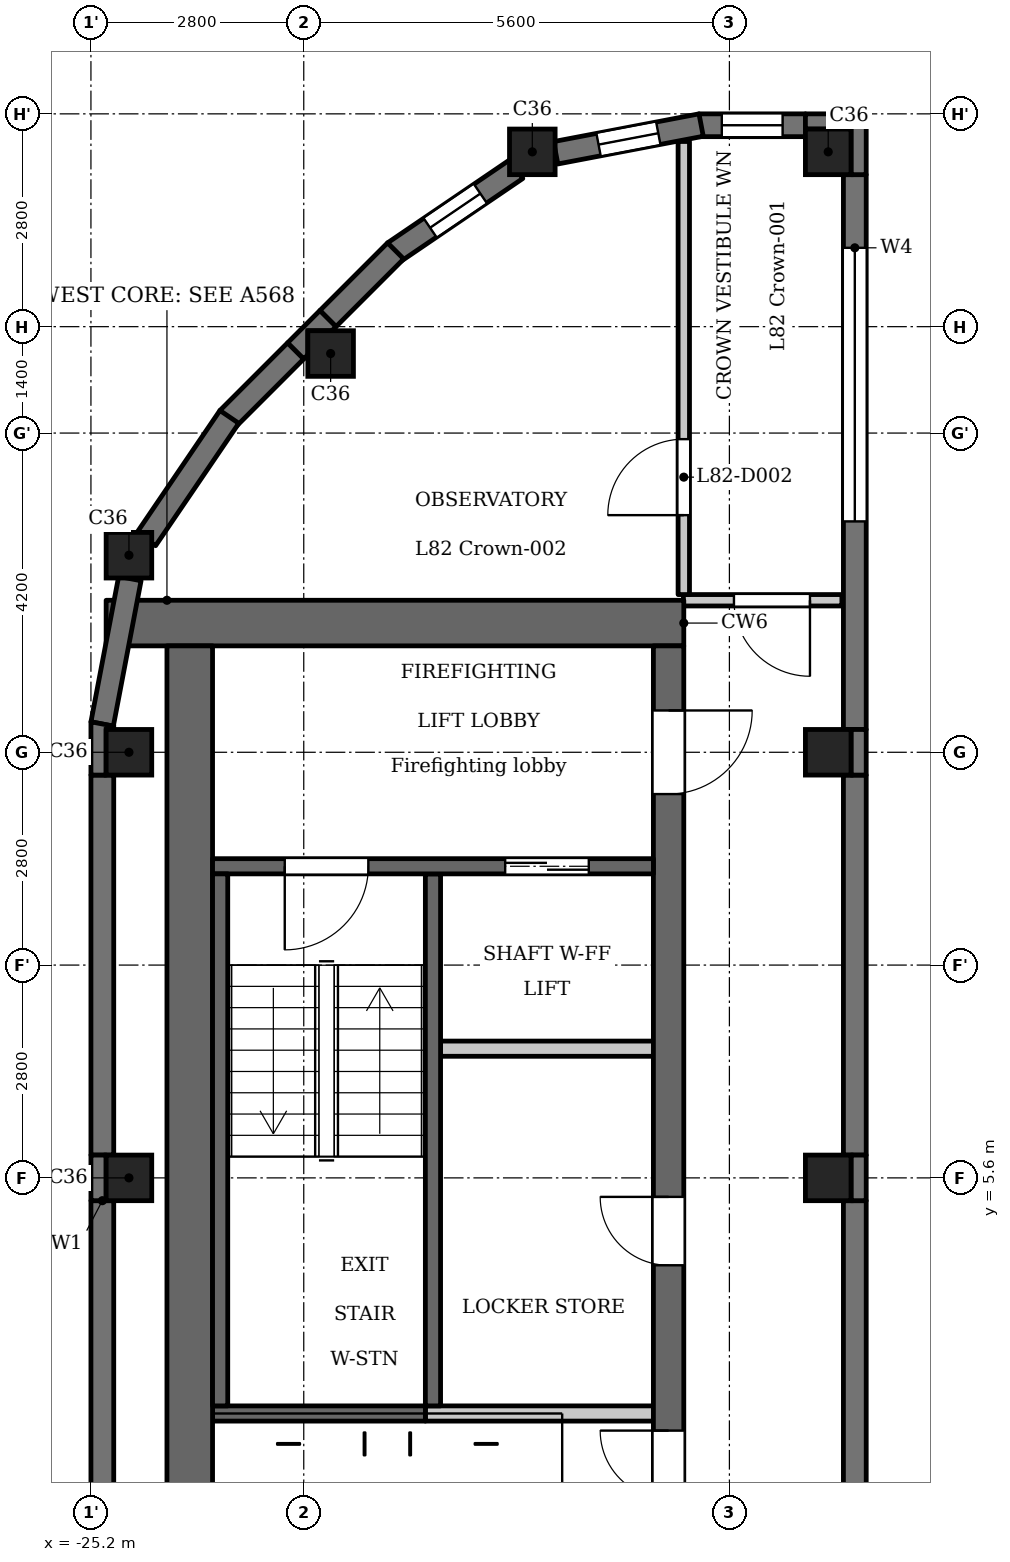
"""IFC4 building model, lengths in metres.
Left out: names, types, materials, properties, quantities, classifications, styles, units other than length and angle.
Written with IfcOpenShell. Run it as: python <this file> out.ifc"""

import sys

from ifc_helpers import new_model, si_unit, direction, frame, frame_2d, origin, origin_2d, place, context, subcontext, project, spatial, polyline, rectangle, outline, extrude, element, fill, save


model = new_model("IFC4")
c1 = context("Model", 3, precision=1e-05, world=origin(), true_north=direction((0.0, 1.0)))
c2 = subcontext(c1, "Body", "Model", "MODEL_VIEW")
j1 = project(units=[si_unit("LENGTHUNIT", "METRE"), si_unit("PLANEANGLEUNIT", "RADIAN")], contexts=[c1])
p1 = place(None, origin())
s1 = spatial("IfcSite", under=j1, at=p1, CompositionType="ELEMENT")
p2 = place(p1, origin())
s2 = spatial("IfcBuilding", under=s1, at=p2, CompositionType="ELEMENT")
p3 = place(p2, frame((0.0, 0.0, 317.4)))
s3 = spatial("IfcBuildingStorey", under=s2, at=p3, CompositionType="ELEMENT", Elevation=317.4)
for number, where, z_axis, x_axis in (
    (1, (-24.7, 5.6, 0.0), (0.0, 0.0, 1.0), (1.0, 0.0, 0.0)),
    (2, (-24.7, 11.2, 0.0), (0.0, 0.0, 1.0), (1.0, 0.0, 0.0)),
    (3, (-24.7, 13.793, 0.0), (0.0, 0.0, 1.0), (1.0, 0.0, 0.0)),
    (4, (-22.046, 16.446, 0.0), (0.0, 0.0, 1.0), (1.0, 0.0, 0.0)),
    (5, (-19.393, 19.1, 0.0), (0.0, 0.0, 1.0), (1.0, 0.0, 0.0)),
    (6, (-15.5, 5.6, 0.0), (0.0, 0.0, 1.0), (1.0, 0.0, 0.0)),
    (7, (-15.5, 11.2, 0.0), (0.0, 0.0, 1.0), (1.0, 0.0, 0.0)),
    (8, (-15.5, 19.1, 0.0), (0.0, 0.0, 1.0), (1.0, 0.0, 0.0)),
):
    element("IfcColumn", number, at=place(p3, frame(where, z_axis=z_axis, x_axis=x_axis)), inside=s3, PredefinedType="COLUMN", context=c2, shape_type="SweptSolid", body=[
        extrude(rectangle(XDim=0.6, YDim=0.6, at=origin_2d()), origin(), (0.0, 0.0, 1.0), 3.5),
    ])
p4 = place(p3, frame((-15.15, -5.3, 0.0), z_axis=(0.0, 0.0, 1.0), x_axis=(0.0, 1.0, 0.0)))
e9 = element("IfcWall", 9, at=p4, inside=s3, PredefinedType="SOLIDWALL", context=c2, shape_type="SweptSolid", body=[
    extrude(rectangle(XDim=10.6, YDim=0.3, at=frame_2d((5.3, 0.0))), origin(), (0.0, 0.0, 1.0), 3.2),
])
p5 = place(p3, frame((-15.15, 5.9, 0.0), z_axis=(0.0, 0.0, 1.0), x_axis=(0.0, 1.0, 0.0)))
e10 = element("IfcWall", 10, at=p5, inside=s3, PredefinedType="SOLIDWALL", context=c2, shape_type="SweptSolid", body=[
    extrude(rectangle(XDim=5.0, YDim=0.3, at=frame_2d((2.5, 0.0))), origin(), (0.0, 0.0, 1.0), 3.2),
])
p6 = place(p3, frame((-15.15, 11.5, 0.0), z_axis=(0.0, 0.0, 1.0), x_axis=(0.0, 1.0, 0.0)))
e11 = element("IfcWall", 11, at=p6, inside=s3, PredefinedType="SOLIDWALL", context=c2, shape_type="SweptSolid", body=[
    extrude(rectangle(XDim=7.3, YDim=0.3, at=frame_2d((3.65, 0.0))), origin(), (0.0, 0.0, 1.0), 3.2),
])
p7 = place(p6, frame((2.738, 0.0, 1.2)))
e12 = element("IfcOpeningElement", 12, at=p7, cuts=e11, PredefinedType="OPENING", context=c2, shape_type="SweptSolid", body=[
    extrude(rectangle(XDim=3.6, YDim=0.95, at=frame_2d((1.8, 0.475))), frame((0.0, 0.16, 0.0), z_axis=(0.0, -1.0, 0.0), x_axis=(1.0, 0.0, 0.0)), (0.0, 0.0, 1.0), 0.32),
])
p8 = place(p3, frame((-15.8, 19.45, 0.0), z_axis=(0.0, 0.0, 1.0), x_axis=(-1.0, 0.0, 0.0)))
e13 = element("IfcWall", 13, at=p8, inside=s3, PredefinedType="SOLIDWALL", context=c2, shape_type="SweptSolid", body=[
    extrude(rectangle(XDim=1.4, YDim=0.3, at=frame_2d((0.7, 0.0))), origin(), (0.0, 0.0, 1.0), 3.2),
])
p9 = place(p8, frame((0.3, 0.0, 0.6)))
e14 = element("IfcOpeningElement", 14, at=p9, cuts=e13, PredefinedType="OPENING", context=c2, shape_type="SweptSolid", body=[
    extrude(rectangle(XDim=0.8, YDim=1.55, at=frame_2d((0.4, 0.775))), frame((0.0, 0.16, 0.0), z_axis=(0.0, -1.0, 0.0), x_axis=(1.0, 0.0, 0.0)), (0.0, 0.0, 1.0), 0.32),
])
p10 = place(p3, frame((-17.172, 19.453, 0.0), z_axis=(0.0, 0.0, 1.0), x_axis=(-0.982286967073, -0.187382801553, 0.0)))
e15 = element("IfcWall", 15, at=p10, inside=s3, PredefinedType="SOLIDWALL", context=c2, shape_type="SweptSolid", body=[
    extrude(rectangle(XDim=1.948, YDim=0.3, at=frame_2d((0.974, 0.0))), origin(), (0.0, 0.0, 1.0), 2.6),
])
p11 = place(p10, frame((0.574, 0.0, 0.6)))
e16 = element("IfcOpeningElement", 16, at=p11, cuts=e15, PredefinedType="OPENING", context=c2, shape_type="SweptSolid", body=[
    extrude(rectangle(XDim=0.8, YDim=1.55, at=frame_2d((0.4, 0.775))), frame((0.0, 0.16, 0.0), z_axis=(0.0, -1.0, 0.0), x_axis=(1.0, 0.0, 0.0)), (0.0, 0.0, 1.0), 0.32),
])
p12 = place(p3, frame((-19.602, 18.874, 0.0), z_axis=(0.0, 0.0, 1.0), x_axis=(-0.827022075481, -0.562169446579, 0.0)))
e17 = element("IfcWall", 17, at=p12, inside=s3, PredefinedType="SOLIDWALL", context=c2, shape_type="SweptSolid", body=[
    extrude(rectangle(XDim=1.948, YDim=0.3, at=frame_2d((0.974, 0.0))), origin(), (0.0, 0.0, 1.0), 2.6),
])
p13 = place(p12, frame((0.574, 0.0, 0.6)))
e18 = element("IfcOpeningElement", 18, at=p13, cuts=e17, PredefinedType="OPENING", context=c2, shape_type="SweptSolid", body=[
    extrude(rectangle(XDim=0.8, YDim=1.55, at=frame_2d((0.4, 0.775))), frame((0.0, 0.16, 0.0), z_axis=(0.0, -1.0, 0.0), x_axis=(1.0, 0.0, 0.0)), (0.0, 0.0, 1.0), 0.32),
])
for number, where, z_axis, x_axis in (
    (19, (-21.191, 17.797, 0.0), (0.0, 0.0, 1.0), (-0.707, -0.707, 0.0)),
    (20, (-22.506, 16.482, 0.0), (0.0, 0.0, 1.0), (-0.707, -0.707, 0.0)),
):
    element("IfcWall", number, at=place(p3, frame(where, z_axis=z_axis, x_axis=x_axis)), inside=s3, PredefinedType="SOLIDWALL", context=c2, shape_type="SweptSolid", body=[
        extrude(rectangle(XDim=1.26, YDim=0.3, at=frame_2d((0.63, 0.0))), origin(), (0.0, 0.0, 1.0), 3.2),
    ])
p14 = place(p3, frame((-23.379, 15.613, 0.0), z_axis=(0.0, 0.0, 1.0), x_axis=(-0.562025435703, -0.827119948752, 0.0)))
e21 = element("IfcWall", 21, at=p14, inside=s3, PredefinedType="SOLIDWALL", context=c2, shape_type="SweptSolid", body=[
    extrude(rectangle(XDim=1.948, YDim=0.3, at=frame_2d((0.974, 0.0))), origin(), (0.0, 0.0, 1.0), 2.6),
])
p15 = place(p3, frame((-24.688, 13.485, 0.0), z_axis=(0.0, 0.0, 1.0), x_axis=(-0.187354129902, -0.982292436095, 0.0)))
e22 = element("IfcWall", 22, at=p15, inside=s3, PredefinedType="SOLIDWALL", context=c2, shape_type="SweptSolid", body=[
    extrude(rectangle(XDim=1.947, YDim=0.3, at=frame_2d((0.973, 0.0))), origin(), (0.0, 0.0, 1.0), 2.6),
])
p16 = place(p3, frame((-25.05, 10.9, 0.0), z_axis=(0.0, 0.0, 1.0), x_axis=(0.0, -1.0, 0.0)))
e23 = element("IfcWall", 23, at=p16, inside=s3, PredefinedType="SOLIDWALL", context=c2, shape_type="SweptSolid", body=[
    extrude(rectangle(XDim=5.0, YDim=0.3, at=frame_2d((2.5, 0.0))), origin(), (0.0, 0.0, 1.0), 3.2),
])
p17 = place(p3, frame((-25.05, 5.3, 0.0), z_axis=(0.0, 0.0, 1.0), x_axis=(0.0, -1.0, 0.0)))
e24 = element("IfcWall", 24, at=p17, inside=s3, PredefinedType="SOLIDWALL", context=c2, shape_type="SweptSolid", body=[
    extrude(rectangle(XDim=10.6, YDim=0.3, at=frame_2d((5.3, 0.0))), origin(), (0.0, 0.0, 1.0), 3.2),
])
p18 = place(p3, frame((-20.7, 2.6, 0.0), z_axis=(0.0, 0.0, 1.0), x_axis=(0.0, 1.0, 0.0)))
e25 = element("IfcWall", 25, at=p18, inside=s3, PredefinedType="SHEAR", context=c2, shape_type="SweptSolid", body=[
    extrude(rectangle(XDim=7.0, YDim=0.2, at=frame_2d((3.5, 0.0))), origin(), (0.0, 0.0, 1.0), 3.2),
])
p19 = place(p3, frame((-20.8, 2.5, 0.0), z_axis=(0.0, 0.0, 1.0), x_axis=(-1.0, 0.0, 0.0)))
e26 = element("IfcWall", 26, at=p19, inside=s3, PredefinedType="SHEAR", context=c2, shape_type="SweptSolid", body=[
    extrude(rectangle(XDim=2.8, YDim=0.2, at=frame_2d((1.4, 0.0))), origin(), (0.0, 0.0, 1.0), 3.2),
])
p20 = place(p3, frame((-17.4, 12.9, 0.0), z_axis=(0.0, 0.0, 1.0), x_axis=(-1.0, 0.0, 0.0)))
e27 = element("IfcWall", 27, at=p20, inside=s3, PredefinedType="SHEAR", context=c2, shape_type="SweptSolid", body=[
    extrude(rectangle(XDim=7.6, YDim=0.6, at=frame_2d((3.8, 0.0))), origin(), (0.0, 0.0, 1.0), 3.2),
])
p21 = place(p3, frame((-17.6, -12.6, 0.0), z_axis=(0.0, 0.0, 1.0), x_axis=(0.0, 1.0, 0.0)))
e28 = element("IfcWall", 28, at=p21, inside=s3, PredefinedType="SHEAR", context=c2, shape_type="SweptSolid", body=[
    extrude(rectangle(XDim=25.2, YDim=0.4, at=frame_2d((12.6, 0.0))), origin(), (0.0, 0.0, 1.0), 3.2),
])
p22 = place(p21, frame((8.8, 0.0, 0.0)))
e29 = element("IfcOpeningElement", 29, at=p22, cuts=e28, PredefinedType="OPENING", context=c2, shape_type="SweptSolid", body=[
    extrude(rectangle(XDim=0.9, YDim=2.1, at=frame_2d((0.45, 1.05))), frame((0.0, 0.21, 0.0), z_axis=(0.0, -1.0, 0.0), x_axis=(1.0, 0.0, 0.0)), (0.0, 0.0, 1.0), 0.42),
])
p23 = place(p21, frame((17.05, 0.0, 0.0)))
e30 = element("IfcOpeningElement", 30, at=p23, cuts=e28, PredefinedType="OPENING", context=c2, shape_type="SweptSolid", body=[
    extrude(rectangle(XDim=0.9, YDim=2.1, at=frame_2d((0.45, 1.05))), frame((0.0, 0.21, 0.0), z_axis=(0.0, -1.0, 0.0), x_axis=(1.0, 0.0, 0.0)), (0.0, 0.0, 1.0), 0.42),
])
p24 = place(p21, frame((23.25, 0.0, 0.0)))
e31 = element("IfcOpeningElement", 31, at=p24, cuts=e28, PredefinedType="OPENING", context=c2, shape_type="SweptSolid", body=[
    extrude(rectangle(XDim=1.1, YDim=2.1, at=frame_2d((0.55, 1.05))), frame((0.0, 0.21, 0.0), z_axis=(0.0, -1.0, 0.0), x_axis=(1.0, 0.0, 0.0)), (0.0, 0.0, 1.0), 0.42),
])
p25 = place(p21, frame((0.85, 0.0, 0.0)))
e32 = element("IfcOpeningElement", 32, at=p25, cuts=e28, PredefinedType="OPENING", context=c2, shape_type="SweptSolid", body=[
    extrude(rectangle(XDim=1.1, YDim=2.1, at=frame_2d((0.55, 1.05))), frame((0.0, 0.21, 0.0), z_axis=(0.0, -1.0, 0.0), x_axis=(1.0, 0.0, 0.0)), (0.0, 0.0, 1.0), 0.42),
])
p26 = place(p21, frame((13.075, 0.0, 0.0)))
e33 = element("IfcOpeningElement", 33, at=p26, cuts=e28, PredefinedType="OPENING", context=c2, shape_type="SweptSolid", body=[
    extrude(rectangle(XDim=1.8, YDim=2.1, at=frame_2d((0.9, 1.05))), frame((0.0, 0.21, 0.0), z_axis=(0.0, -1.0, 0.0), x_axis=(1.0, 0.0, 0.0)), (0.0, 0.0, 1.0), 0.42),
])
p27 = place(p3, frame((-23.9, -12.6, 0.0), z_axis=(0.0, 0.0, 1.0), x_axis=(0.0, 1.0, 0.0)))
e34 = element("IfcWall", 34, at=p27, inside=s3, PredefinedType="SHEAR", context=c2, shape_type="SweptSolid", body=[
    extrude(rectangle(XDim=25.2, YDim=0.6, at=frame_2d((12.6, 0.0))), origin(), (0.0, 0.0, 1.0), 3.2),
])
p28 = place(p3, frame((-17.8, 2.5, 0.0), z_axis=(0.0, 0.0, 1.0), x_axis=(-1.0, 0.0, 0.0)))
e35 = element("IfcWall", 35, at=p28, inside=s3, PredefinedType="PARTITIONING", context=c2, shape_type="SweptSolid", body=[
    extrude(rectangle(XDim=3.0, YDim=0.2, at=frame_2d((1.5, 0.0))), origin(), (0.0, 0.0, 1.0), 3.2),
])
p29 = place(p3, frame((-17.8, 7.3, 0.0), z_axis=(0.0, 0.0, 1.0), x_axis=(-1.0, 0.0, 0.0)))
e36 = element("IfcWall", 36, at=p29, inside=s3, PredefinedType="PARTITIONING", context=c2, shape_type="SweptSolid", body=[
    extrude(rectangle(XDim=2.8, YDim=0.2, at=frame_2d((1.4, 0.0))), origin(), (0.0, 0.0, 1.0), 3.2),
])
p30 = place(p3, frame((-17.8, 9.7, 0.0), z_axis=(0.0, 0.0, 1.0), x_axis=(-1.0, 0.0, 0.0)))
e37 = element("IfcWall", 37, at=p30, inside=s3, PredefinedType="SHEAR", context=c2, shape_type="SweptSolid", body=[
    extrude(rectangle(XDim=5.8, YDim=0.2, at=frame_2d((2.9, 0.0))), origin(), (0.0, 0.0, 1.0), 3.2),
])
p31 = place(p30, frame((0.85, 0.0, 0.0)))
e38 = element("IfcOpeningElement", 38, at=p31, cuts=e37, PredefinedType="OPENING", context=c2, shape_type="SweptSolid", body=[
    extrude(rectangle(XDim=1.1, YDim=2.1, at=frame_2d((0.55, 1.05))), frame((0.0, 0.11, 0.0), z_axis=(0.0, -1.0, 0.0), x_axis=(1.0, 0.0, 0.0)), (0.0, 0.0, 1.0), 0.22),
])
p32 = place(p30, frame((3.75, 0.0, 0.0)))
e39 = element("IfcOpeningElement", 39, at=p32, cuts=e37, PredefinedType="OPENING", context=c2, shape_type="SweptSolid", body=[
    extrude(rectangle(XDim=1.1, YDim=2.1, at=frame_2d((0.55, 1.05))), frame((0.0, 0.11, 0.0), z_axis=(0.0, -1.0, 0.0), x_axis=(1.0, 0.0, 0.0)), (0.0, 0.0, 1.0), 0.22),
])
p33 = place(p3, frame((-23.5, 2.6, 0.0), z_axis=(0.0, 0.0, 1.0), x_axis=(0.0, 1.0, 0.0)))
e40 = element("IfcWall", 40, at=p33, inside=s3, PredefinedType="SHEAR", context=c2, shape_type="SweptSolid", body=[
    extrude(rectangle(XDim=7.0, YDim=0.2, at=frame_2d((3.5, 0.0))), origin(), (0.0, 0.0, 1.0), 3.2),
])
p34 = place(p3, frame((-17.405, 13.2, 0.0), z_axis=(0.0, 0.0, 1.0), x_axis=(1.0, 0.0, 0.0)))
e41 = element("IfcWall", 41, at=p34, inside=s3, PredefinedType="PARTITIONING", context=c2, shape_type="SweptSolid", body=[
    extrude(rectangle(XDim=2.085, YDim=0.15, at=frame_2d((1.042, 0.0))), origin(), (0.0, 0.0, 1.0), 3.2),
])
p35 = place(p34, frame((0.665, 0.0, 0.0)))
e42 = element("IfcOpeningElement", 42, at=p35, cuts=e41, PredefinedType="OPENING", context=c2, shape_type="SweptSolid", body=[
    extrude(rectangle(XDim=1.0, YDim=2.1, at=frame_2d((0.5, 1.05))), frame((0.0, 0.085, 0.0), z_axis=(0.0, -1.0, 0.0), x_axis=(1.0, 0.0, 0.0)), (0.0, 0.0, 1.0), 0.17),
])
p36 = place(p3, frame((-17.4, 13.275, 0.0), z_axis=(0.0, 0.0, 1.0), x_axis=(0.0, 1.0, 0.0)))
e43 = element("IfcWall", 43, at=p36, inside=s3, PredefinedType="PARTITIONING", context=c2, shape_type="SweptSolid", body=[
    extrude(rectangle(XDim=5.961, YDim=0.15, at=frame_2d((2.981, 0.0))), origin(), (0.0, 0.0, 1.0), 3.2),
])
p37 = place(p36, frame((1.045, 0.0, 0.0)))
e44 = element("IfcOpeningElement", 44, at=p37, cuts=e43, PredefinedType="OPENING", context=c2, shape_type="SweptSolid", body=[
    extrude(rectangle(XDim=1.0, YDim=2.1, at=frame_2d((0.5, 1.05))), frame((0.0, 0.085, 0.0), z_axis=(0.0, -1.0, 0.0), x_axis=(1.0, 0.0, 0.0)), (0.0, 0.0, 1.0), 0.17),
])
p38 = place(p3, origin())
e45 = element("IfcWall", 45, at=p38, inside=s3, PredefinedType="SOLIDWALL", context=c2, shape_type="SweptSolid", body=[
    extrude(outline(polyline([(-25.0, 5.9), (-25.2, 5.9), (-25.2, 5.3), (-25.0, 5.3), (-25.0, 5.9)])), origin(), (0.0, 0.0, 1.0), 3.2),
])
e46 = element("IfcWall", 46, at=p38, inside=s3, PredefinedType="SOLIDWALL", context=c2, shape_type="SweptSolid", body=[
    extrude(outline(polyline([(-25.2, 11.601), (-25.2, 10.9), (-25.0, 10.9), (-25.0, 11.5), (-24.9, 11.5), (-24.9, 11.561), (-24.903, 11.544), (-25.2, 11.601)])), origin(), (0.0, 0.0, 1.0), 3.2),
])
e47 = element("IfcWall", 47, at=p38, inside=s3, PredefinedType="SOLIDWALL", context=c2, shape_type="SweptSolid", body=[
    extrude(outline(polyline([(-21.976, 16.8), (-22.188, 17.012), (-22.612, 16.588), (-22.4, 16.376), (-22.346, 16.429), (-22.346, 16.746), (-22.029, 16.746), (-21.976, 16.8)])), origin(), (0.0, 0.0, 1.0), 3.2),
])
e48 = element("IfcWall", 48, at=p38, inside=s3, PredefinedType="SOLIDWALL", context=c2, shape_type="SweptSolid", body=[
    extrude(outline(polyline([(-15.0, 18.8), (-15.0, 19.6), (-15.8, 19.6), (-15.8, 19.4), (-15.2, 19.4), (-15.2, 18.8), (-15.0, 18.8)])), origin(), (0.0, 0.0, 1.0), 3.2),
])
e49 = element("IfcWall", 49, at=p38, inside=s3, PredefinedType="SOLIDWALL", context=c2, shape_type="SweptSolid", body=[
    extrude(outline(polyline([(-15.2, 10.9), (-15.0, 10.9), (-15.0, 11.5), (-15.2, 11.5), (-15.2, 10.9)])), origin(), (0.0, 0.0, 1.0), 3.2),
])
e50 = element("IfcWall", 50, at=p38, inside=s3, PredefinedType="SOLIDWALL", context=c2, shape_type="SweptSolid", body=[
    extrude(outline(polyline([(-15.2, 5.3), (-15.0, 5.3), (-15.0, 5.9), (-15.3, 5.9), (-15.2, 5.9), (-15.2, 5.3)])), origin(), (0.0, 0.0, 1.0), 3.2),
])
p39 = place(p23, origin())
e51 = element("IfcDoor", 51, at=p39, inside=s3, OperationType="SINGLE_SWING_LEFT", PredefinedType="DOOR", context=c2, shape_type="SweptSolid", body=[
    extrude(rectangle(XDim=0.9, YDim=2.1, at=frame_2d((0.45, 1.05))), frame((0.0, 0.025, 0.0), z_axis=(0.0, -1.0, 0.0), x_axis=(1.0, 0.0, 0.0)), (0.0, 0.0, 1.0), 0.05),
])
fill(e30, e51)
p40 = place(p31, origin())
e52 = element("IfcDoor", 52, at=p40, inside=s3, OperationType="DOUBLE_DOOR_SLIDING", PredefinedType="DOOR", context=c2, shape_type="SweptSolid", body=[
    extrude(rectangle(XDim=1.1, YDim=2.1, at=frame_2d((0.55, 1.05))), frame((0.0, 0.025, 0.0), z_axis=(0.0, -1.0, 0.0), x_axis=(1.0, 0.0, 0.0)), (0.0, 0.0, 1.0), 0.05),
])
fill(e38, e52)
p41 = place(p24, origin())
e53 = element("IfcDoor", 53, at=p41, inside=s3, OperationType="SINGLE_SWING_RIGHT", PredefinedType="DOOR", context=c2, shape_type="SweptSolid", body=[
    extrude(rectangle(XDim=1.1, YDim=2.1, at=frame_2d((0.55, 1.05))), frame((0.0, 0.025, 0.0), z_axis=(0.0, -1.0, 0.0), x_axis=(1.0, 0.0, 0.0)), (0.0, 0.0, 1.0), 0.05),
])
fill(e31, e53)
p42 = place(p32, origin())
e54 = element("IfcDoor", 54, at=p42, inside=s3, OperationType="SINGLE_SWING_LEFT", PredefinedType="DOOR", context=c2, shape_type="SweptSolid", body=[
    extrude(rectangle(XDim=1.1, YDim=2.1, at=frame_2d((0.55, 1.05))), frame((0.0, 0.025, 0.0), z_axis=(0.0, -1.0, 0.0), x_axis=(1.0, 0.0, 0.0)), (0.0, 0.0, 1.0), 0.05),
])
fill(e39, e54)
p43 = place(p26, origin())
e55 = element("IfcDoor", 55, at=p43, inside=s3, OperationType="DOUBLE_DOOR_SINGLE_SWING", PredefinedType="DOOR", context=c2, shape_type="SweptSolid", body=[
    extrude(rectangle(XDim=1.8, YDim=2.1, at=frame_2d((0.9, 1.05))), frame((0.0, 0.025, 0.0), z_axis=(0.0, -1.0, 0.0), x_axis=(1.0, 0.0, 0.0)), (0.0, 0.0, 1.0), 0.05),
])
fill(e33, e55)
p44 = place(p35, origin())
e56 = element("IfcDoor", 56, at=p44, inside=s3, OperationType="SINGLE_SWING_RIGHT", PredefinedType="DOOR", context=c2, shape_type="SweptSolid", body=[
    extrude(rectangle(XDim=1.0, YDim=2.1, at=frame_2d((0.5, 1.05))), frame((0.0, 0.025, 0.0), z_axis=(0.0, -1.0, 0.0), x_axis=(1.0, 0.0, 0.0)), (0.0, 0.0, 1.0), 0.05),
])
fill(e42, e56)
p45 = place(p37, origin())
e57 = element("IfcDoor", 57, at=p45, inside=s3, OperationType="SINGLE_SWING_RIGHT", PredefinedType="DOOR", context=c2, shape_type="SweptSolid", body=[
    extrude(rectangle(XDim=1.0, YDim=2.1, at=frame_2d((0.5, 1.05))), frame((0.0, 0.025, 0.0), z_axis=(0.0, -1.0, 0.0), x_axis=(1.0, 0.0, 0.0)), (0.0, 0.0, 1.0), 0.05),
])
fill(e44, e57)
p46 = place(p7, origin())
e58 = element("IfcWindow", 58, at=p46, inside=s3, PartitioningType="SINGLE_PANEL", PredefinedType="WINDOW", context=c2, shape_type="SweptSolid", body=[
    extrude(rectangle(XDim=3.6, YDim=0.95, at=frame_2d((1.8, 0.475))), frame((0.0, 0.03, 0.0), z_axis=(0.0, -1.0, 0.0), x_axis=(1.0, 0.0, 0.0)), (0.0, 0.0, 1.0), 0.06),
])
fill(e12, e58)
p47 = place(p9, origin())
e59 = element("IfcWindow", 59, at=p47, inside=s3, PartitioningType="SINGLE_PANEL", PredefinedType="WINDOW", context=c2, shape_type="SweptSolid", body=[
    extrude(rectangle(XDim=0.8, YDim=1.55, at=frame_2d((0.4, 0.775))), frame((0.0, 0.03, 0.0), z_axis=(0.0, -1.0, 0.0), x_axis=(1.0, 0.0, 0.0)), (0.0, 0.0, 1.0), 0.06),
])
fill(e14, e59)
p48 = place(p11, origin())
e60 = element("IfcWindow", 60, at=p48, inside=s3, PartitioningType="SINGLE_PANEL", PredefinedType="WINDOW", context=c2, shape_type="SweptSolid", body=[
    extrude(rectangle(XDim=0.8, YDim=1.55, at=frame_2d((0.4, 0.775))), frame((0.0, 0.03, 0.0), z_axis=(0.0, -1.0, 0.0), x_axis=(1.0, 0.0, 0.0)), (0.0, 0.0, 1.0), 0.06),
])
fill(e16, e60)
p49 = place(p13, origin())
e61 = element("IfcWindow", 61, at=p49, inside=s3, PartitioningType="SINGLE_PANEL", PredefinedType="WINDOW", context=c2, shape_type="SweptSolid", body=[
    extrude(rectangle(XDim=0.8, YDim=1.55, at=frame_2d((0.4, 0.775))), frame((0.0, 0.03, 0.0), z_axis=(0.0, -1.0, 0.0), x_axis=(1.0, 0.0, 0.0)), (0.0, 0.0, 1.0), 0.06),
])
fill(e18, e61)
save(model, sys.argv[1])
